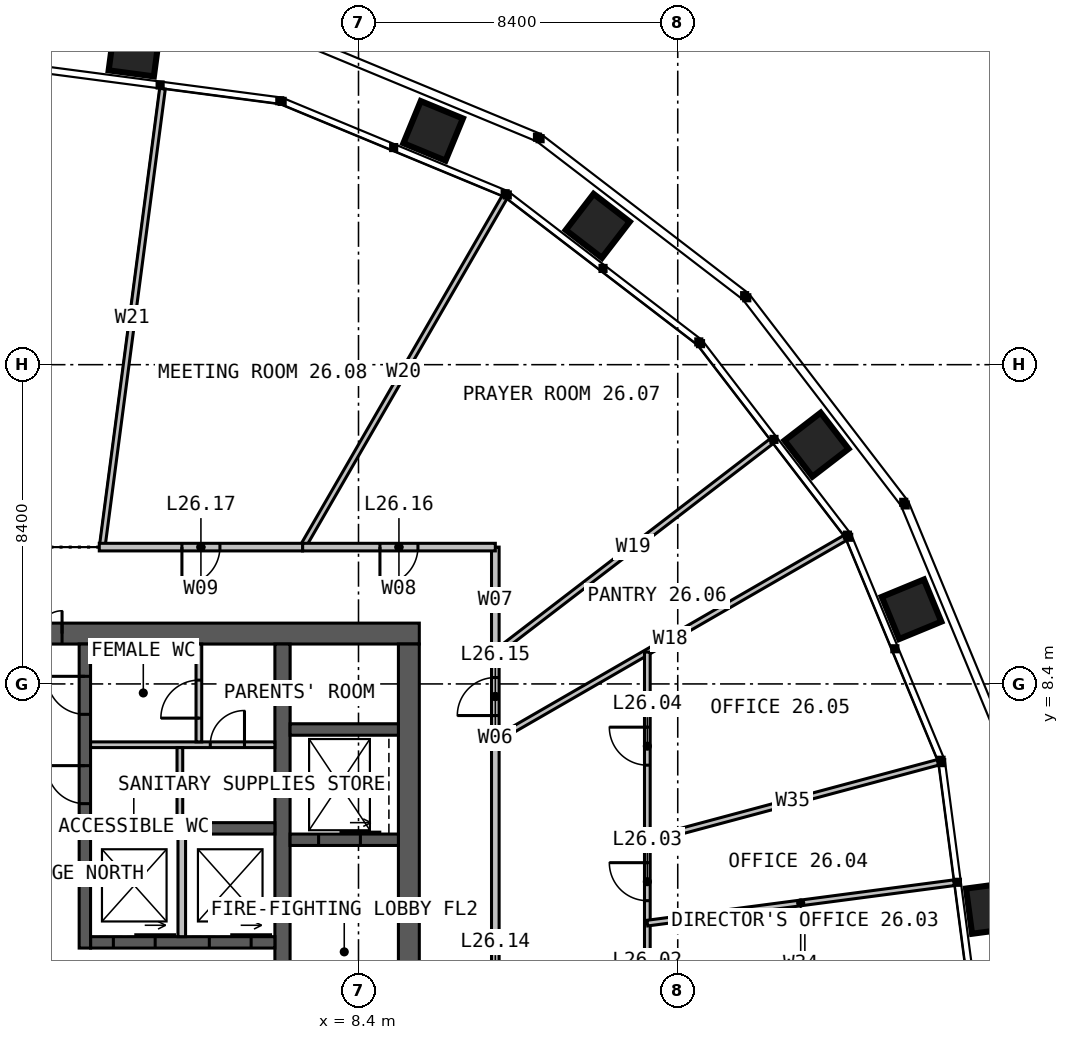
"""IFC4 building model, lengths in metres.
Left out: names, types, materials, properties, quantities, classifications, styles, units other than length and angle.
Written with IfcOpenShell. Run it as: python <this file> out.ifc"""

import sys

from ifc_helpers import new_model, si_unit, direction, frame, frame_2d, origin, place, context, subcontext, project, spatial, rectangle, extrude, element, fill, save


model = new_model("IFC4")
c1 = context("Model", 3, precision=1e-05, world=origin(), true_north=direction((0.0, 1.0)))
c2 = subcontext(c1, "Body", "Model", "MODEL_VIEW")
j1 = project(units=[si_unit("LENGTHUNIT", "METRE"), si_unit("PLANEANGLEUNIT", "RADIAN")], contexts=[c1])
p1 = place(None, origin())
s1 = spatial("IfcSite", under=j1, at=p1, CompositionType="ELEMENT")
p2 = place(p1, origin())
s2 = spatial("IfcBuilding", under=s1, at=p2, CompositionType="ELEMENT")
p3 = place(p2, frame((0.0, 0.0, 110.0)))
s3 = spatial("IfcBuildingStorey", under=s2, at=p3, CompositionType="ELEMENT", Elevation=110.0)
p4 = place(p3, frame((-10.0, 9.725, 0.0), z_axis=(0.0, 0.0, 1.0), x_axis=(1.0, 0.0, 0.0)))
e1 = element("IfcWall", 1, at=p4, inside=s3, PredefinedType="SOLIDWALL", context=c2, shape_type="SweptSolid", body=[
    extrude(rectangle(XDim=20.0, YDim=0.55, at=frame_2d((10.0, 0.0))), origin(), (0.0, 0.0, 1.0), 4.0),
])
p5 = place(p4, frame((9.4, 0.0, 0.0)))
e2 = element("IfcOpeningElement", 2, at=p5, cuts=e1, PredefinedType="OPENING", context=c2, shape_type="SweptSolid", body=[
    extrude(rectangle(XDim=1.2, YDim=2.2, at=frame_2d((0.6, 1.1))), frame((0.0, 0.285, 0.0), z_axis=(0.0, -1.0, 0.0), x_axis=(1.0, 0.0, 0.0)), (0.0, 0.0, 1.0), 0.57),
])
p6 = place(p3, frame((9.725, -9.45, 0.0), z_axis=(0.0, 0.0, 1.0), x_axis=(0.0, 1.0, 0.0)))
e3 = element("IfcWall", 3, at=p6, inside=s3, PredefinedType="SOLIDWALL", context=c2, shape_type="SweptSolid", body=[
    extrude(rectangle(XDim=18.9, YDim=0.55, at=frame_2d((9.45, 0.0))), origin(), (0.0, 0.0, 1.0), 4.0),
])
p7 = place(p3, frame((6.4, 9.45, 0.0), z_axis=(0.0, 0.0, 1.0), x_axis=(0.0, -1.0, 0.0)))
e4 = element("IfcWall", 4, at=p7, inside=s3, PredefinedType="SOLIDWALL", context=c2, shape_type="SweptSolid", body=[
    extrude(rectangle(XDim=18.9, YDim=0.4, at=frame_2d((9.45, 0.0))), origin(), (0.0, 0.0, 1.0), 4.0),
])
p8 = place(p7, frame((8.95, 0.0, 0.0)))
e5 = element("IfcOpeningElement", 5, at=p8, cuts=e4, PredefinedType="OPENING", context=c2, shape_type="SweptSolid", body=[
    extrude(rectangle(XDim=1.0, YDim=2.2, at=frame_2d((0.5, 1.1))), frame((0.0, 0.21, 0.0), z_axis=(0.0, -1.0, 0.0), x_axis=(1.0, 0.0, 0.0)), (0.0, 0.0, 1.0), 0.42),
])
p9 = place(p3, frame((1.35, 1.6, 0.0), z_axis=(0.0, 0.0, 1.0), x_axis=(1.0, 0.0, 0.0)))
e6 = element("IfcWall", 6, at=p9, inside=s3, PredefinedType="SOLIDWALL", context=c2, shape_type="SweptSolid", body=[
    extrude(rectangle(XDim=4.85, YDim=0.3, at=frame_2d((2.425, 0.0))), origin(), (0.0, 0.0, 1.0), 4.0),
])
p10 = place(p9, frame((0.6, 0.0, 0.0)))
e7 = element("IfcOpeningElement", 7, at=p10, cuts=e6, PredefinedType="OPENING", context=c2, shape_type="SweptSolid", body=[
    extrude(rectangle(XDim=1.1, YDim=2.2, at=frame_2d((0.55, 1.1))), frame((0.0, 0.16, 0.0), z_axis=(0.0, -1.0, 0.0), x_axis=(1.0, 0.0, 0.0)), (0.0, 0.0, 1.0), 0.32),
])
p11 = place(p9, frame((3.125, 0.0, 0.0)))
e8 = element("IfcOpeningElement", 8, at=p11, cuts=e6, PredefinedType="OPENING", context=c2, shape_type="SweptSolid", body=[
    extrude(rectangle(XDim=1.1, YDim=2.2, at=frame_2d((0.55, 1.1))), frame((0.0, 0.16, 0.0), z_axis=(0.0, -1.0, 0.0), x_axis=(1.0, 0.0, 0.0)), (0.0, 0.0, 1.0), 0.32),
])
p12 = place(p3, frame((1.35, 4.6, 0.0), z_axis=(0.0, 0.0, 1.0), x_axis=(1.0, 0.0, 0.0)))
e9 = element("IfcWall", 9, at=p12, inside=s3, PredefinedType="SOLIDWALL", context=c2, shape_type="SweptSolid", body=[
    extrude(rectangle(XDim=4.85, YDim=0.3, at=frame_2d((2.425, 0.0))), origin(), (0.0, 0.0, 1.0), 4.0),
])
p13 = place(p3, frame((1.2, 1.45, 0.0), z_axis=(0.0, 0.0, 1.0), x_axis=(0.0, 1.0, 0.0)))
e10 = element("IfcWall", 10, at=p13, inside=s3, PredefinedType="SOLIDWALL", context=c2, shape_type="SweptSolid", body=[
    extrude(rectangle(XDim=8.0, YDim=0.3, at=frame_2d((4.0, 0.0))), origin(), (0.0, 0.0, 1.0), 4.0),
])
p14 = place(p13, frame((3.8, 0.0, 0.0)))
e11 = element("IfcOpeningElement", 11, at=p14, cuts=e10, PredefinedType="OPENING", context=c2, shape_type="SweptSolid", body=[
    extrude(rectangle(XDim=1.0, YDim=2.2, at=frame_2d((0.5, 1.1))), frame((0.0, 0.16, 0.0), z_axis=(0.0, -1.0, 0.0), x_axis=(1.0, 0.0, 0.0)), (0.0, 0.0, 1.0), 0.32),
])
p15 = place(p13, frame((6.15, 0.0, 0.0)))
e12 = element("IfcOpeningElement", 12, at=p15, cuts=e10, PredefinedType="OPENING", context=c2, shape_type="SweptSolid", body=[
    extrude(rectangle(XDim=1.0, YDim=2.2, at=frame_2d((0.5, 1.1))), frame((0.0, 0.16, 0.0), z_axis=(0.0, -1.0, 0.0), x_axis=(1.0, 0.0, 0.0)), (0.0, 0.0, 1.0), 0.32),
])
p16 = place(p3, frame((6.6, 4.3, 0.0), z_axis=(0.0, 0.0, 1.0), x_axis=(1.0, 0.0, 0.0)))
e13 = element("IfcWall", 13, at=p16, inside=s3, PredefinedType="SOLIDWALL", context=c2, shape_type="SweptSolid", body=[
    extrude(rectangle(XDim=2.85, YDim=0.3, at=frame_2d((1.425, 0.0))), origin(), (0.0, 0.0, 1.0), 4.0),
])
p17 = place(p16, frame((0.75, 0.0, 0.0)))
e14 = element("IfcOpeningElement", 14, at=p17, cuts=e13, PredefinedType="OPENING", context=c2, shape_type="SweptSolid", body=[
    extrude(rectangle(XDim=1.1, YDim=2.2, at=frame_2d((0.55, 1.1))), frame((0.0, 0.16, 0.0), z_axis=(0.0, -1.0, 0.0), x_axis=(1.0, 0.0, 0.0)), (0.0, 0.0, 1.0), 0.32),
])
p18 = place(p3, frame((6.6, 7.2, 0.0), z_axis=(0.0, 0.0, 1.0), x_axis=(1.0, 0.0, 0.0)))
e15 = element("IfcWall", 15, at=p18, inside=s3, PredefinedType="SOLIDWALL", context=c2, shape_type="SweptSolid", body=[
    extrude(rectangle(XDim=2.85, YDim=0.3, at=frame_2d((1.425, 0.0))), origin(), (0.0, 0.0, 1.0), 4.0),
])
p19 = place(p3, frame((3.75, 1.75, 0.0), z_axis=(0.0, 0.0, 1.0), x_axis=(0.0, 1.0, 0.0)))
e16 = element("IfcWall", 16, at=p19, inside=s3, PredefinedType="SOLIDWALL", context=c2, shape_type="SweptSolid", body=[
    extrude(rectangle(XDim=2.7, YDim=0.2, at=frame_2d((1.35, 0.0))), origin(), (0.0, 0.0, 1.0), 3.75),
])
p20 = place(p3, frame((1.35, 6.8, 0.0), z_axis=(0.0, 0.0, 1.0), x_axis=(1.0, 0.0, 0.0)))
e17 = element("IfcWall", 17, at=p20, inside=s3, PredefinedType="PARTITIONING", context=c2, shape_type="SweptSolid", body=[
    extrude(rectangle(XDim=4.85, YDim=0.15, at=frame_2d((2.425, 0.0))), origin(), (0.0, 0.0, 1.0), 3.75),
])
p21 = place(p20, frame((3.15, 0.0, 0.0)))
e18 = element("IfcOpeningElement", 18, at=p21, cuts=e17, PredefinedType="OPENING", context=c2, shape_type="SweptSolid", body=[
    extrude(rectangle(XDim=0.9, YDim=2.2, at=frame_2d((0.45, 1.1))), frame((0.0, 0.085, 0.0), z_axis=(0.0, -1.0, 0.0), x_axis=(1.0, 0.0, 0.0)), (0.0, 0.0, 1.0), 0.17),
])
p22 = place(p3, frame((3.7, 4.75, 0.0), z_axis=(0.0, 0.0, 1.0), x_axis=(0.0, 1.0, 0.0)))
e19 = element("IfcWall", 19, at=p22, inside=s3, PredefinedType="PARTITIONING", context=c2, shape_type="SweptSolid", body=[
    extrude(rectangle(XDim=1.975, YDim=0.15, at=frame_2d((0.988, 0.0))), origin(), (0.0, 0.0, 1.0), 3.75),
])
p23 = place(p3, frame((4.2, 6.875, 0.0), z_axis=(0.0, 0.0, 1.0), x_axis=(0.0, 1.0, 0.0)))
e20 = element("IfcWall", 20, at=p23, inside=s3, PredefinedType="PARTITIONING", context=c2, shape_type="SweptSolid", body=[
    extrude(rectangle(XDim=2.575, YDim=0.15, at=frame_2d((1.288, 0.0))), origin(), (0.0, 0.0, 1.0), 3.75),
])
p24 = place(p23, frame((0.625, 0.0, 0.0)))
e21 = element("IfcOpeningElement", 21, at=p24, cuts=e20, PredefinedType="OPENING", context=c2, shape_type="SweptSolid", body=[
    extrude(rectangle(XDim=1.0, YDim=2.2, at=frame_2d((0.5, 1.1))), frame((0.0, 0.085, 0.0), z_axis=(0.0, -1.0, 0.0), x_axis=(1.0, 0.0, 0.0)), (0.0, 0.0, 1.0), 0.17),
])
p25 = place(p3, frame((12.0, 6.928, 0.0), z_axis=(0.0, 0.0, 1.0), x_axis=(0.866024197053, 0.500002090115, 0.0)))
e22 = element("IfcWall", 22, at=p25, inside=s3, PredefinedType="PARTITIONING", context=c2, shape_type="SweptSolid", body=[
    extrude(rectangle(XDim=10.631, YDim=0.15, at=frame_2d((5.315, 0.0))), origin(), (0.0, 0.0, 1.0), 2.79),
])
p26 = place(p3, frame((12.0, 9.208, 0.0), z_axis=(0.0, 0.0, 1.0), x_axis=(0.793357264949, 0.608756314261, 0.0)))
e23 = element("IfcWall", 23, at=p26, inside=s3, PredefinedType="PARTITIONING", context=c2, shape_type="SweptSolid", body=[
    extrude(rectangle(XDim=9.152, YDim=0.15, at=frame_2d((4.576, 0.0))), origin(), (0.0, 0.0, 1.0), 2.79),
])
p27 = place(p3, frame((6.928, 12.0, 0.0), z_axis=(0.0, 0.0, 1.0), x_axis=(0.500002090115, 0.866024197053, 0.0)))
e24 = element("IfcWall", 24, at=p27, inside=s3, PredefinedType="PARTITIONING", context=c2, shape_type="SweptSolid", body=[
    extrude(rectangle(XDim=10.631, YDim=0.15, at=frame_2d((5.315, 0.0))), origin(), (0.0, 0.0, 1.0), 2.79),
])
p28 = place(p3, frame((1.654, 11.99, 0.0), z_axis=(0.0, 0.0, 1.0), x_axis=(0.130491344121, 0.99144944859, 0.0)))
e25 = element("IfcWall", 25, at=p28, inside=s3, PredefinedType="PARTITIONING", context=c2, shape_type="SweptSolid", body=[
    extrude(rectangle(XDim=12.174, YDim=0.15, at=frame_2d((6.087, 0.0))), origin(), (0.0, 0.0, 1.0), 2.79),
])
p29 = place(p3, frame((16.0, -9.238, 0.0), z_axis=(0.0, 0.0, 1.0), x_axis=(0.0, 1.0, 0.0)))
e26 = element("IfcWall", 26, at=p29, inside=s3, PredefinedType="PARTITIONING", context=c2, shape_type="SweptSolid", body=[
    extrude(rectangle(XDim=18.475, YDim=0.15, at=frame_2d((9.238, 0.0))), origin(), (0.0, 0.0, 1.0), 2.79),
])
p30 = place(p29, frame((3.066, 0.0, 0.0)))
e27 = element("IfcOpeningElement", 27, at=p30, cuts=e26, PredefinedType="OPENING", context=c2, shape_type="SweptSolid", body=[
    extrude(rectangle(XDim=1.0, YDim=2.2, at=frame_2d((0.5, 1.1))), frame((0.0, 0.085, 0.0), z_axis=(0.0, -1.0, 0.0), x_axis=(1.0, 0.0, 0.0)), (0.0, 0.0, 1.0), 0.17),
])
p31 = place(p29, frame((8.738, 0.0, 0.0)))
e28 = element("IfcOpeningElement", 28, at=p31, cuts=e26, PredefinedType="OPENING", context=c2, shape_type="SweptSolid", body=[
    extrude(rectangle(XDim=1.0, YDim=2.2, at=frame_2d((0.5, 1.1))), frame((0.0, 0.085, 0.0), z_axis=(0.0, -1.0, 0.0), x_axis=(1.0, 0.0, 0.0)), (0.0, 0.0, 1.0), 0.17),
])
p32 = place(p29, frame((11.934, 0.0, 0.0)))
e29 = element("IfcOpeningElement", 29, at=p32, cuts=e26, PredefinedType="OPENING", context=c2, shape_type="SweptSolid", body=[
    extrude(rectangle(XDim=1.0, YDim=2.2, at=frame_2d((0.5, 1.1))), frame((0.0, 0.085, 0.0), z_axis=(0.0, -1.0, 0.0), x_axis=(1.0, 0.0, 0.0)), (0.0, 0.0, 1.0), 0.17),
])
p33 = place(p29, frame((15.5, 0.0, 0.0)))
e30 = element("IfcOpeningElement", 30, at=p33, cuts=e26, PredefinedType="OPENING", context=c2, shape_type="SweptSolid", body=[
    extrude(rectangle(XDim=1.0, YDim=2.2, at=frame_2d((0.5, 1.1))), frame((0.0, 0.085, 0.0), z_axis=(0.0, -1.0, 0.0), x_axis=(1.0, 0.0, 0.0)), (0.0, 0.0, 1.0), 0.17),
])
p34 = place(p3, frame((16.0, 2.106, 0.0), z_axis=(0.0, 0.0, 1.0), x_axis=(0.99144398145, 0.13053287573, 0.0)))
e31 = element("IfcWall", 31, at=p34, inside=s3, PredefinedType="PARTITIONING", context=c2, shape_type="SweptSolid", body=[
    extrude(rectangle(XDim=8.14, YDim=0.15, at=frame_2d((4.07, 0.0))), origin(), (0.0, 0.0, 1.0), 2.79),
])
p35 = place(p3, frame((16.0, 4.287, 0.0), z_axis=(0.0, 0.0, 1.0), x_axis=(0.965926869261, 0.258815152648, 0.0)))
e32 = element("IfcWall", 32, at=p35, inside=s3, PredefinedType="PARTITIONING", context=c2, shape_type="SweptSolid", body=[
    extrude(rectangle(XDim=7.923, YDim=0.15, at=frame_2d((3.961, 0.0))), origin(), (0.0, 0.0, 1.0), 2.79),
])
p36 = place(p3, frame((12.0, -6.928, 0.0), z_axis=(0.0, 0.0, 1.0), x_axis=(0.0, 1.0, 0.0)))
e33 = element("IfcWall", 33, at=p36, inside=s3, PredefinedType="PARTITIONING", context=c2, shape_type="SweptSolid", body=[
    extrude(rectangle(XDim=13.856, YDim=0.2, at=frame_2d((6.928, 0.0))), origin(), (0.0, 0.0, 1.0), 3.8),
])
p37 = place(p36, frame((6.028, 0.0, 0.0)))
e34 = element("IfcOpeningElement", 34, at=p37, cuts=e33, PredefinedType="OPENING", context=c2, shape_type="SweptSolid", body=[
    extrude(rectangle(XDim=1.8, YDim=2.2, at=frame_2d((0.9, 1.1))), frame((0.0, 0.11, 0.0), z_axis=(0.0, -1.0, 0.0), x_axis=(1.0, 0.0, 0.0)), (0.0, 0.0, 1.0), 0.22),
])
p38 = place(p3, frame((12.0, 6.928, 0.0), z_axis=(0.0, 0.0, 1.0), x_axis=(0.0, 1.0, 0.0)))
e35 = element("IfcWall", 35, at=p38, inside=s3, PredefinedType="PARTITIONING", context=c2, shape_type="SweptSolid", body=[
    extrude(rectangle(XDim=2.28, YDim=0.2, at=frame_2d((1.14, 0.0))), origin(), (0.0, 0.0, 1.0), 3.8),
])
p39 = place(p38, frame((0.64, 0.0, 0.0)))
e36 = element("IfcOpeningElement", 36, at=p39, cuts=e35, PredefinedType="OPENING", context=c2, shape_type="SweptSolid", body=[
    extrude(rectangle(XDim=1.0, YDim=2.2, at=frame_2d((0.5, 1.1))), frame((0.0, 0.11, 0.0), z_axis=(0.0, -1.0, 0.0), x_axis=(1.0, 0.0, 0.0)), (0.0, 0.0, 1.0), 0.22),
])
p40 = place(p3, frame((12.0, 9.208, 0.0), z_axis=(0.0, 0.0, 1.0), x_axis=(0.0, 1.0, 0.0)))
e37 = element("IfcWall", 37, at=p40, inside=s3, PredefinedType="PARTITIONING", context=c2, shape_type="SweptSolid", body=[
    extrude(rectangle(XDim=2.792, YDim=0.2, at=frame_2d((1.396, 0.0))), origin(), (0.0, 0.0, 1.0), 3.8),
])
p41 = place(p3, frame((12.0, 12.0, 0.0), z_axis=(0.0, 0.0, 1.0), x_axis=(-1.0, 0.0, 0.0)))
e38 = element("IfcWall", 38, at=p41, inside=s3, PredefinedType="PARTITIONING", context=c2, shape_type="SweptSolid", body=[
    extrude(rectangle(XDim=5.072, YDim=0.2, at=frame_2d((2.536, 0.0))), origin(), (0.0, 0.0, 1.0), 3.8),
])
p42 = place(p41, frame((2.036, 0.0, 0.0)))
e39 = element("IfcOpeningElement", 39, at=p42, cuts=e38, PredefinedType="OPENING", context=c2, shape_type="SweptSolid", body=[
    extrude(rectangle(XDim=1.0, YDim=2.2, at=frame_2d((0.5, 1.1))), frame((0.0, 0.11, 0.0), z_axis=(0.0, -1.0, 0.0), x_axis=(1.0, 0.0, 0.0)), (0.0, 0.0, 1.0), 0.22),
])
p43 = place(p3, frame((6.928, 12.0, 0.0), z_axis=(0.0, 0.0, 1.0), x_axis=(-1.0, 0.0, 0.0)))
e40 = element("IfcWall", 40, at=p43, inside=s3, PredefinedType="PARTITIONING", context=c2, shape_type="SweptSolid", body=[
    extrude(rectangle(XDim=5.349, YDim=0.2, at=frame_2d((2.674, 0.0))), origin(), (0.0, 0.0, 1.0), 3.8),
])
p44 = place(p43, frame((2.174, 0.0, 0.0)))
e41 = element("IfcOpeningElement", 41, at=p44, cuts=e40, PredefinedType="OPENING", context=c2, shape_type="SweptSolid", body=[
    extrude(rectangle(XDim=1.0, YDim=2.2, at=frame_2d((0.5, 1.1))), frame((0.0, 0.11, 0.0), z_axis=(0.0, -1.0, 0.0), x_axis=(1.0, 0.0, 0.0)), (0.0, 0.0, 1.0), 0.22),
])
p45 = place(p5, origin())
e42 = element("IfcDoor", 42, at=p45, inside=s3, OperationType="DOUBLE_DOOR_SINGLE_SWING", PredefinedType="DOOR", context=c2, shape_type="SweptSolid", body=[
    extrude(rectangle(XDim=1.2, YDim=2.2, at=frame_2d((0.6, 1.1))), frame((0.0, 0.025, 0.0), z_axis=(0.0, -1.0, 0.0), x_axis=(1.0, 0.0, 0.0)), (0.0, 0.0, 1.0), 0.05),
])
fill(e2, e42)
p46 = place(p14, origin())
e43 = element("IfcDoor", 43, at=p46, inside=s3, OperationType="SINGLE_SWING_RIGHT", PredefinedType="DOOR", context=c2, shape_type="SweptSolid", body=[
    extrude(rectangle(XDim=1.0, YDim=2.2, at=frame_2d((0.5, 1.1))), frame((0.0, 0.025, 0.0), z_axis=(0.0, -1.0, 0.0), x_axis=(1.0, 0.0, 0.0)), (0.0, 0.0, 1.0), 0.05),
])
fill(e11, e43)
p47 = place(p15, origin())
e44 = element("IfcDoor", 44, at=p47, inside=s3, OperationType="SINGLE_SWING_RIGHT", PredefinedType="DOOR", context=c2, shape_type="SweptSolid", body=[
    extrude(rectangle(XDim=1.0, YDim=2.2, at=frame_2d((0.5, 1.1))), frame((0.0, 0.025, 0.0), z_axis=(0.0, -1.0, 0.0), x_axis=(1.0, 0.0, 0.0)), (0.0, 0.0, 1.0), 0.05),
])
fill(e12, e44)
p48 = place(p21, origin())
e45 = element("IfcDoor", 45, at=p48, inside=s3, OperationType="SINGLE_SWING_RIGHT", PredefinedType="DOOR", context=c2, shape_type="SweptSolid", body=[
    extrude(rectangle(XDim=0.9, YDim=2.2, at=frame_2d((0.45, 1.1))), frame((0.0, 0.025, 0.0), z_axis=(0.0, -1.0, 0.0), x_axis=(1.0, 0.0, 0.0)), (0.0, 0.0, 1.0), 0.05),
])
fill(e18, e45)
p49 = place(p24, origin())
e46 = element("IfcDoor", 46, at=p49, inside=s3, OperationType="SINGLE_SWING_LEFT", PredefinedType="DOOR", context=c2, shape_type="SweptSolid", body=[
    extrude(rectangle(XDim=1.0, YDim=2.2, at=frame_2d((0.5, 1.1))), frame((0.0, 0.025, 0.0), z_axis=(0.0, -1.0, 0.0), x_axis=(1.0, 0.0, 0.0)), (0.0, 0.0, 1.0), 0.05),
])
fill(e21, e46)
p50 = place(p10, origin())
e47 = element("IfcDoor", 47, at=p50, inside=s3, OperationType="SLIDING_TO_LEFT", PredefinedType="DOOR", context=c2, shape_type="SweptSolid", body=[
    extrude(rectangle(XDim=1.1, YDim=2.2, at=frame_2d((0.55, 1.1))), frame((0.0, 0.025, 0.0), z_axis=(0.0, -1.0, 0.0), x_axis=(1.0, 0.0, 0.0)), (0.0, 0.0, 1.0), 0.05),
])
fill(e7, e47)
p51 = place(p11, origin())
e48 = element("IfcDoor", 48, at=p51, inside=s3, OperationType="SLIDING_TO_LEFT", PredefinedType="DOOR", context=c2, shape_type="SweptSolid", body=[
    extrude(rectangle(XDim=1.1, YDim=2.2, at=frame_2d((0.55, 1.1))), frame((0.0, 0.025, 0.0), z_axis=(0.0, -1.0, 0.0), x_axis=(1.0, 0.0, 0.0)), (0.0, 0.0, 1.0), 0.05),
])
fill(e8, e48)
p52 = place(p17, origin())
e49 = element("IfcDoor", 49, at=p52, inside=s3, OperationType="SLIDING_TO_LEFT", PredefinedType="DOOR", context=c2, shape_type="SweptSolid", body=[
    extrude(rectangle(XDim=1.1, YDim=2.2, at=frame_2d((0.55, 1.1))), frame((0.0, 0.025, 0.0), z_axis=(0.0, -1.0, 0.0), x_axis=(1.0, 0.0, 0.0)), (0.0, 0.0, 1.0), 0.05),
])
fill(e14, e49)
p53 = place(p32, origin())
e50 = element("IfcDoor", 50, at=p53, inside=s3, OperationType="SINGLE_SWING_RIGHT", PredefinedType="DOOR", context=c2, shape_type="SweptSolid", body=[
    extrude(rectangle(XDim=1.0, YDim=2.2, at=frame_2d((0.5, 1.1))), frame((0.0, 0.025, 0.0), z_axis=(0.0, -1.0, 0.0), x_axis=(1.0, 0.0, 0.0)), (0.0, 0.0, 1.0), 0.05),
])
fill(e29, e50)
p54 = place(p33, origin())
e51 = element("IfcDoor", 51, at=p54, inside=s3, OperationType="SINGLE_SWING_RIGHT", PredefinedType="DOOR", context=c2, shape_type="SweptSolid", body=[
    extrude(rectangle(XDim=1.0, YDim=2.2, at=frame_2d((0.5, 1.1))), frame((0.0, 0.025, 0.0), z_axis=(0.0, -1.0, 0.0), x_axis=(1.0, 0.0, 0.0)), (0.0, 0.0, 1.0), 0.05),
])
fill(e30, e51)
p55 = place(p39, origin())
e52 = element("IfcDoor", 52, at=p55, inside=s3, OperationType="SINGLE_SWING_LEFT", PredefinedType="DOOR", context=c2, shape_type="SweptSolid", body=[
    extrude(rectangle(XDim=1.0, YDim=2.2, at=frame_2d((0.5, 1.1))), frame((0.0, 0.025, 0.0), z_axis=(0.0, -1.0, 0.0), x_axis=(1.0, 0.0, 0.0)), (0.0, 0.0, 1.0), 0.05),
])
fill(e36, e52)
p56 = place(p42, origin())
e53 = element("IfcDoor", 53, at=p56, inside=s3, OperationType="SINGLE_SWING_RIGHT", PredefinedType="DOOR", context=c2, shape_type="SweptSolid", body=[
    extrude(rectangle(XDim=1.0, YDim=2.2, at=frame_2d((0.5, 1.1))), frame((0.0, 0.025, 0.0), z_axis=(0.0, -1.0, 0.0), x_axis=(1.0, 0.0, 0.0)), (0.0, 0.0, 1.0), 0.05),
])
fill(e39, e53)
p57 = place(p44, origin())
e54 = element("IfcDoor", 54, at=p57, inside=s3, OperationType="SINGLE_SWING_RIGHT", PredefinedType="DOOR", context=c2, shape_type="SweptSolid", body=[
    extrude(rectangle(XDim=1.0, YDim=2.2, at=frame_2d((0.5, 1.1))), frame((0.0, 0.025, 0.0), z_axis=(0.0, -1.0, 0.0), x_axis=(1.0, 0.0, 0.0)), (0.0, 0.0, 1.0), 0.05),
])
fill(e41, e54)
save(model, sys.argv[1])
